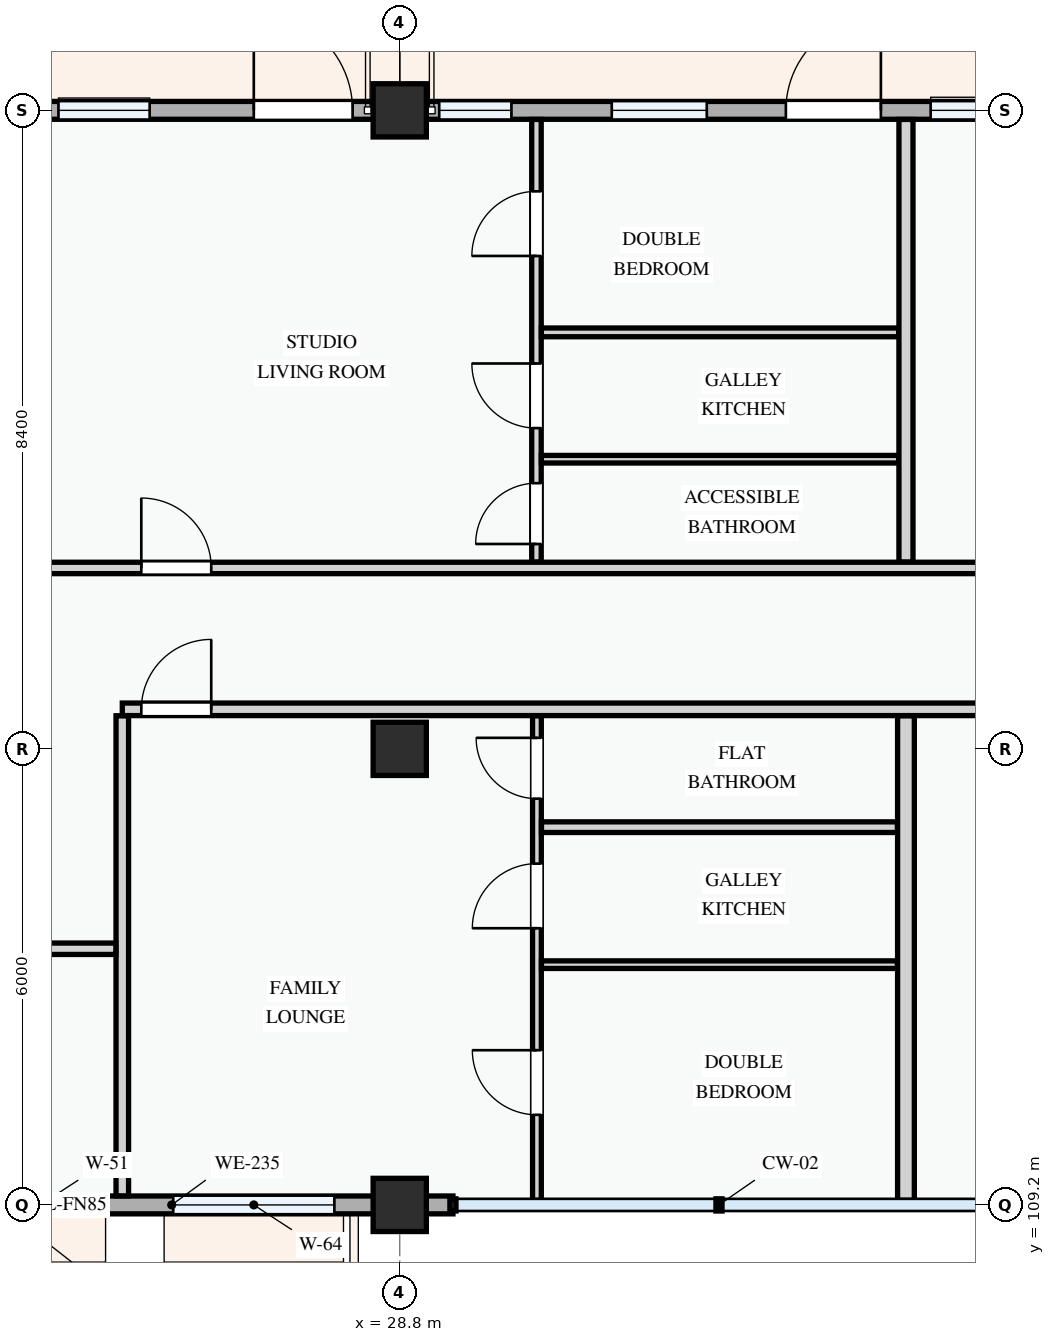
"""IFC4 building model, lengths in metres.
Left out: names, types, materials, properties, quantities, classifications, styles, units other than length and angle.
Written with IfcOpenShell. Run it as: python <this file> out.ifc"""

import sys

from ifc_helpers import new_model, si_unit, direction, frame, frame_2d, origin, origin_2d, place, context, subcontext, project, spatial, rectangle, extrude, element, fill, save


model = new_model("IFC4")
c1 = context("Model", 3, precision=1e-05, world=origin(), true_north=direction((0.0, 1.0)))
c2 = subcontext(c1, "Body", "Model", "MODEL_VIEW")
j1 = project(units=[si_unit("LENGTHUNIT", "METRE"), si_unit("PLANEANGLEUNIT", "RADIAN")], contexts=[c1])
p1 = place(None, origin())
s1 = spatial("IfcSite", under=j1, at=p1, CompositionType="ELEMENT")
p2 = place(p1, origin())
s2 = spatial("IfcBuilding", under=s1, at=p2, CompositionType="ELEMENT")
p3 = place(p2, frame((0.0, 0.0, 11.4)))
s3 = spatial("IfcBuildingStorey", under=s2, at=p3, CompositionType="ELEMENT", Elevation=11.4)
for number, where, z_axis, x_axis in (
    (1, (28.8, 109.2, 0.0), (0.0, 0.0, 1.0), (1.0, 0.0, 0.0)),
    (2, (28.8, 115.2, 0.0), (0.0, 0.0, 1.0), (1.0, 0.0, 0.0)),
    (3, (28.8, 123.6, 0.0), (0.0, 0.0, 1.0), (1.0, 0.0, 0.0)),
):
    element("IfcColumn", number, at=place(p3, frame(where, z_axis=z_axis, x_axis=x_axis)), inside=s3, PredefinedType="COLUMN", context=c2, shape_type="SweptSolid", body=[
        extrude(rectangle(XDim=0.7, YDim=0.7, at=origin_2d()), origin(), (0.0, 0.0, 1.0), 3.3),
    ])
p4 = place(p3, frame((22.8, 109.2, 0.0), z_axis=(0.0, 0.0, 1.0), x_axis=(1.0, 0.0, 0.0)))
e4 = element("IfcWall", 4, at=p4, inside=s3, PredefinedType="STANDARD", context=c2, shape_type="SweptSolid", body=[
    extrude(rectangle(XDim=6.0, YDim=0.235, at=frame_2d((3.0, 0.0))), origin(), (0.0, 0.0, 1.0), 2.475),
])
p5 = place(p4, frame((0.53, 0.0, 0.78)))
e5 = element("IfcOpeningElement", 5, at=p5, cuts=e4, PredefinedType="OPENING", context=c2, shape_type="SweptSolid", body=[
    extrude(rectangle(XDim=1.48, YDim=1.52, at=frame_2d((0.74, 0.76))), frame((0.0, 0.127, 0.0), z_axis=(0.0, -1.0, 0.0), x_axis=(1.0, 0.0, 0.0)), (0.0, 0.0, 1.0), 0.255),
])
p6 = place(p4, frame((3.02, 0.0, 0.78)))
e6 = element("IfcOpeningElement", 6, at=p6, cuts=e4, PredefinedType="OPENING", context=c2, shape_type="SweptSolid", body=[
    extrude(rectangle(XDim=2.12, YDim=1.44, at=frame_2d((1.06, 0.72))), frame((0.0, 0.127, 0.0), z_axis=(0.0, -1.0, 0.0), x_axis=(1.0, 0.0, 0.0)), (0.0, 0.0, 1.0), 0.255),
])
p7 = place(p3, frame((28.8, 109.2, 0.0), z_axis=(0.0, 0.0, 1.0), x_axis=(1.0, 0.0, 0.0)))
e7 = element("IfcWall", 7, at=p7, inside=s3, PredefinedType="STANDARD", context=c2, shape_type="SweptSolid", body=[
    extrude(rectangle(XDim=0.7, YDim=0.235, at=frame_2d((0.35, 0.0))), origin(), (0.0, 0.0, 1.0), 2.375),
])
p8 = place(p3, frame((37.2, 123.6, 0.0), z_axis=(0.0, 0.0, 1.0), x_axis=(-1.0, 0.0, 0.0)))
e8 = element("IfcWall", 8, at=p8, inside=s3, PredefinedType="STANDARD", context=c2, shape_type="SweptSolid", body=[
    extrude(rectangle(XDim=8.4, YDim=0.235, at=frame_2d((4.2, 0.0))), origin(), (0.0, 0.0, 1.0), 2.375),
])
p9 = place(p8, frame((2.07, 0.0, 0.0)))
e9 = element("IfcOpeningElement", 9, at=p9, cuts=e8, PredefinedType="OPENING", context=c2, shape_type="SweptSolid", body=[
    extrude(rectangle(XDim=1.25, YDim=2.2, at=frame_2d((0.625, 1.1))), frame((0.0, 0.127, 0.0), z_axis=(0.0, -1.0, 0.0), x_axis=(1.0, 0.0, 0.0)), (0.0, 0.0, 1.0), 0.255),
])
p10 = place(p8, frame((0.515, 0.0, 0.78)))
e10 = element("IfcOpeningElement", 10, at=p10, cuts=e8, PredefinedType="OPENING", context=c2, shape_type="SweptSolid", body=[
    extrude(rectangle(XDim=0.9, YDim=1.2, at=frame_2d((0.45, 0.6))), frame((0.0, 0.127, 0.0), z_axis=(0.0, -1.0, 0.0), x_axis=(1.0, 0.0, 0.0)), (0.0, 0.0, 1.0), 0.255),
])
p11 = place(p8, frame((4.361, 0.0, 0.78)))
e11 = element("IfcOpeningElement", 11, at=p11, cuts=e8, PredefinedType="OPENING", context=c2, shape_type="SweptSolid", body=[
    extrude(rectangle(XDim=1.25, YDim=1.45, at=frame_2d((0.625, 0.725))), frame((0.0, 0.127, 0.0), z_axis=(0.0, -1.0, 0.0), x_axis=(1.0, 0.0, 0.0)), (0.0, 0.0, 1.0), 0.255),
])
p12 = place(p8, frame((6.931, 0.0, 0.78)))
e12 = element("IfcOpeningElement", 12, at=p12, cuts=e8, PredefinedType="OPENING", context=c2, shape_type="SweptSolid", body=[
    extrude(rectangle(XDim=0.95, YDim=1.15, at=frame_2d((0.475, 0.575))), frame((0.0, 0.127, 0.0), z_axis=(0.0, -1.0, 0.0), x_axis=(1.0, 0.0, 0.0)), (0.0, 0.0, 1.0), 0.255),
])
p13 = place(p3, frame((28.8, 123.6, 0.0), z_axis=(0.0, 0.0, 1.0), x_axis=(-1.0, 0.0, 0.0)))
e13 = element("IfcWall", 13, at=p13, inside=s3, PredefinedType="STANDARD", context=c2, shape_type="SweptSolid", body=[
    extrude(rectangle(XDim=6.0, YDim=0.235, at=frame_2d((3.0, 0.0))), origin(), (0.0, 0.0, 1.0), 2.475),
])
p14 = place(p13, frame((0.62, 0.0, 0.0)))
e14 = element("IfcOpeningElement", 14, at=p14, cuts=e13, PredefinedType="OPENING", context=c2, shape_type="SweptSolid", body=[
    extrude(rectangle(XDim=1.3, YDim=2.15, at=frame_2d((0.65, 1.075))), frame((0.0, 0.127, 0.0), z_axis=(0.0, -1.0, 0.0), x_axis=(1.0, 0.0, 0.0)), (0.0, 0.0, 1.0), 0.255),
])
p15 = place(p13, frame((3.29, 0.0, 0.78)))
e15 = element("IfcOpeningElement", 15, at=p15, cuts=e13, PredefinedType="OPENING", context=c2, shape_type="SweptSolid", body=[
    extrude(rectangle(XDim=1.2, YDim=1.35, at=frame_2d((0.6, 0.675))), frame((0.0, 0.127, 0.0), z_axis=(0.0, -1.0, 0.0), x_axis=(1.0, 0.0, 0.0)), (0.0, 0.0, 1.0), 0.255),
])
p16 = place(p3, frame((25.15, 109.32, 0.0), z_axis=(0.0, 0.0, 1.0), x_axis=(0.0, 1.0, 0.0)))
e16 = element("IfcWall", 16, at=p16, inside=s3, PredefinedType="PARTITIONING", context=c2, shape_type="SweptSolid", body=[
    extrude(rectangle(XDim=6.316, YDim=0.165, at=frame_2d((3.158, 0.0))), origin(), (0.0, 0.0, 1.0), 3.0),
])
p17 = place(p3, frame((22.66, 112.57, 0.0), z_axis=(0.0, 0.0, 1.0), x_axis=(1.0, 0.0, 0.0)))
e17 = element("IfcWall", 17, at=p17, inside=s3, PredefinedType="PARTITIONING", context=c2, shape_type="SweptSolid", body=[
    extrude(rectangle(XDim=2.406, YDim=0.15, at=frame_2d((1.203, 0.0))), origin(), (0.0, 0.0, 1.0), 3.0),
])
p18 = place(p3, frame((30.605, 109.26, 0.0), z_axis=(0.0, 0.0, 1.0), x_axis=(0.0, 1.0, 0.0)))
e18 = element("IfcWall", 18, at=p18, inside=s3, PredefinedType="PARTITIONING", context=c2, shape_type="SweptSolid", body=[
    extrude(rectangle(XDim=6.375, YDim=0.115, at=frame_2d((3.188, 0.0))), origin(), (0.0, 0.0, 1.0), 3.0),
])
p19 = place(p18, frame((1.125, 0.0, 0.0)))
e19 = element("IfcOpeningElement", 19, at=p19, cuts=e18, PredefinedType="OPENING", context=c2, shape_type="SweptSolid", body=[
    extrude(rectangle(XDim=0.85, YDim=2.1, at=frame_2d((0.425, 1.05))), frame((0.0, 0.067, 0.0), z_axis=(0.0, -1.0, 0.0), x_axis=(1.0, 0.0, 0.0)), (0.0, 0.0, 1.0), 0.135),
])
p20 = place(p18, frame((3.58, 0.0, 0.0)))
e20 = element("IfcOpeningElement", 20, at=p20, cuts=e18, PredefinedType="OPENING", context=c2, shape_type="SweptSolid", body=[
    extrude(rectangle(XDim=0.85, YDim=2.1, at=frame_2d((0.425, 1.05))), frame((0.0, 0.067, 0.0), z_axis=(0.0, -1.0, 0.0), x_axis=(1.0, 0.0, 0.0)), (0.0, 0.0, 1.0), 0.135),
])
p21 = place(p18, frame((5.285, 0.0, 0.0)))
e21 = element("IfcOpeningElement", 21, at=p21, cuts=e18, PredefinedType="OPENING", context=c2, shape_type="SweptSolid", body=[
    extrude(rectangle(XDim=0.8, YDim=2.1, at=frame_2d((0.4, 1.05))), frame((0.0, 0.067, 0.0), z_axis=(0.0, -1.0, 0.0), x_axis=(1.0, 0.0, 0.0)), (0.0, 0.0, 1.0), 0.135),
])
p22 = place(p3, frame((30.665, 112.361, 0.0), z_axis=(0.0, 0.0, 1.0), x_axis=(1.0, 0.0, 0.0)))
e22 = element("IfcWall", 22, at=p22, inside=s3, PredefinedType="PARTITIONING", context=c2, shape_type="SweptSolid", body=[
    extrude(rectangle(XDim=4.683, YDim=0.1, at=frame_2d((2.342, 0.0))), origin(), (0.0, 0.0, 1.0), 3.0),
])
p23 = place(p3, frame((30.665, 114.17, 0.0), z_axis=(0.0, 0.0, 1.0), x_axis=(1.0, 0.0, 0.0)))
e23 = element("IfcWall", 23, at=p23, inside=s3, PredefinedType="PARTITIONING", context=c2, shape_type="SweptSolid", body=[
    extrude(rectangle(XDim=4.683, YDim=0.14, at=frame_2d((2.342, 0.0))), origin(), (0.0, 0.0, 1.0), 3.0),
])
p24 = place(p3, frame((30.599, 117.657, 0.0), z_axis=(0.0, 0.0, 1.0), x_axis=(0.0, 1.0, 0.0)))
e24 = element("IfcWall", 24, at=p24, inside=s3, PredefinedType="PARTITIONING", context=c2, shape_type="SweptSolid", body=[
    extrude(rectangle(XDim=5.823, YDim=0.125, at=frame_2d((2.912, 0.0))), origin(), (0.0, 0.0, 1.0), 3.0),
])
p25 = place(p24, frame((0.238, 0.0, 0.0)))
e25 = element("IfcOpeningElement", 25, at=p25, cuts=e24, PredefinedType="OPENING", context=c2, shape_type="SweptSolid", body=[
    extrude(rectangle(XDim=0.8, YDim=2.1, at=frame_2d((0.4, 1.05))), frame((0.0, 0.073, 0.0), z_axis=(0.0, -1.0, 0.0), x_axis=(1.0, 0.0, 0.0)), (0.0, 0.0, 1.0), 0.145),
])
p26 = place(p24, frame((1.763, 0.0, 0.0)))
e26 = element("IfcOpeningElement", 26, at=p26, cuts=e24, PredefinedType="OPENING", context=c2, shape_type="SweptSolid", body=[
    extrude(rectangle(XDim=0.85, YDim=2.1, at=frame_2d((0.425, 1.05))), frame((0.0, 0.073, 0.0), z_axis=(0.0, -1.0, 0.0), x_axis=(1.0, 0.0, 0.0)), (0.0, 0.0, 1.0), 0.145),
])
p27 = place(p24, frame((4.028, 0.0, 0.0)))
e27 = element("IfcOpeningElement", 27, at=p27, cuts=e24, PredefinedType="OPENING", context=c2, shape_type="SweptSolid", body=[
    extrude(rectangle(XDim=0.85, YDim=2.1, at=frame_2d((0.425, 1.05))), frame((0.0, 0.073, 0.0), z_axis=(0.0, -1.0, 0.0), x_axis=(1.0, 0.0, 0.0)), (0.0, 0.0, 1.0), 0.145),
])
p28 = place(p3, frame((30.663, 120.679, 0.0), z_axis=(0.0, 0.0, 1.0), x_axis=(1.0, 0.0, 0.0)))
e28 = element("IfcWall", 28, at=p28, inside=s3, PredefinedType="PARTITIONING", context=c2, shape_type="SweptSolid", body=[
    extrude(rectangle(XDim=4.702, YDim=0.115, at=frame_2d((2.351, 0.0))), origin(), (0.0, 0.0, 1.0), 3.0),
])
p29 = place(p3, frame((30.663, 119.01, 0.0), z_axis=(0.0, 0.0, 1.0), x_axis=(1.0, 0.0, 0.0)))
e29 = element("IfcWall", 29, at=p29, inside=s3, PredefinedType="PARTITIONING", context=c2, shape_type="SweptSolid", body=[
    extrude(rectangle(XDim=4.702, YDim=0.1, at=frame_2d((2.351, 0.0))), origin(), (0.0, 0.0, 1.0), 3.0),
])
p30 = place(p3, frame((35.46, 109.26, 0.0), z_axis=(0.0, 0.0, 1.0), x_axis=(0.0, 1.0, 0.0)))
e30 = element("IfcWall", 30, at=p30, inside=s3, PredefinedType="PARTITIONING", context=c2, shape_type="SweptSolid", body=[
    extrude(rectangle(XDim=6.375, YDim=0.22, at=frame_2d((3.188, 0.0))), origin(), (0.0, 0.0, 1.0), 3.0),
])
p31 = place(p3, frame((35.46, 117.657, 0.0), z_axis=(0.0, 0.0, 1.0), x_axis=(0.0, 1.0, 0.0)))
e31 = element("IfcWall", 31, at=p31, inside=s3, PredefinedType="PARTITIONING", context=c2, shape_type="SweptSolid", body=[
    extrude(rectangle(XDim=5.823, YDim=0.185, at=frame_2d((2.912, 0.0))), origin(), (0.0, 0.0, 1.0), 3.0),
])
p32 = place(p3, frame((25.15, 115.72, 0.0), z_axis=(0.0, 0.0, 1.0), x_axis=(1.0, 0.0, 0.0)))
e32 = element("IfcWall", 32, at=p32, inside=s3, PredefinedType="PARTITIONING", context=c2, shape_type="SweptSolid", body=[
    extrude(rectangle(XDim=32.331, YDim=0.165, at=frame_2d((16.165, 0.0))), origin(), (0.0, 0.0, 1.0), 3.0),
])
p33 = place(p32, frame((0.25, 0.0, 0.0)))
e33 = element("IfcOpeningElement", 33, at=p33, cuts=e32, PredefinedType="OPENING", context=c2, shape_type="SweptSolid", body=[
    extrude(rectangle(XDim=0.92, YDim=2.1, at=frame_2d((0.46, 1.05))), frame((0.0, 0.093, 0.0), z_axis=(0.0, -1.0, 0.0), x_axis=(1.0, 0.0, 0.0)), (0.0, 0.0, 1.0), 0.185),
])
p34 = place(p32, frame((14.548, 0.0, 0.0)))
e34 = element("IfcOpeningElement", 34, at=p34, cuts=e32, PredefinedType="OPENING", context=c2, shape_type="SweptSolid", body=[
    extrude(rectangle(XDim=0.96, YDim=2.12, at=frame_2d((0.48, 1.06))), frame((0.0, 0.093, 0.0), z_axis=(0.0, -1.0, 0.0), x_axis=(1.0, 0.0, 0.0)), (0.0, 0.0, 1.0), 0.185),
])
p35 = place(p32, frame((22.28, 0.0, 0.0)))
e35 = element("IfcOpeningElement", 35, at=p35, cuts=e32, PredefinedType="OPENING", context=c2, shape_type="SweptSolid", body=[
    extrude(rectangle(XDim=0.92, YDim=2.1, at=frame_2d((0.46, 1.05))), frame((0.0, 0.093, 0.0), z_axis=(0.0, -1.0, 0.0), x_axis=(1.0, 0.0, 0.0)), (0.0, 0.0, 1.0), 0.185),
])
p36 = place(p3, frame((22.66, 117.58, 0.0), z_axis=(0.0, 0.0, 1.0), x_axis=(1.0, 0.0, 0.0)))
e36 = element("IfcWall", 36, at=p36, inside=s3, PredefinedType="PARTITIONING", context=c2, shape_type="SweptSolid", body=[
    extrude(rectangle(XDim=34.88, YDim=0.15, at=frame_2d((17.44, 0.0))), origin(), (0.0, 0.0, 1.0), 3.0),
])
p37 = place(p36, frame((2.74, 0.0, 0.0)))
e37 = element("IfcOpeningElement", 37, at=p37, cuts=e36, PredefinedType="OPENING", context=c2, shape_type="SweptSolid", body=[
    extrude(rectangle(XDim=0.92, YDim=2.1, at=frame_2d((0.46, 1.05))), frame((0.0, 0.085, 0.0), z_axis=(0.0, -1.0, 0.0), x_axis=(1.0, 0.0, 0.0)), (0.0, 0.0, 1.0), 0.17),
])
p38 = place(p36, frame((17.085, 0.0, 0.0)))
e38 = element("IfcOpeningElement", 38, at=p38, cuts=e36, PredefinedType="OPENING", context=c2, shape_type="SweptSolid", body=[
    extrude(rectangle(XDim=0.92, YDim=2.1, at=frame_2d((0.46, 1.05))), frame((0.0, 0.085, 0.0), z_axis=(0.0, -1.0, 0.0), x_axis=(1.0, 0.0, 0.0)), (0.0, 0.0, 1.0), 0.17),
])
p39 = place(p36, frame((24.77, 0.0, 0.0)))
e39 = element("IfcOpeningElement", 39, at=p39, cuts=e36, PredefinedType="OPENING", context=c2, shape_type="SweptSolid", body=[
    extrude(rectangle(XDim=0.92, YDim=2.1, at=frame_2d((0.46, 1.05))), frame((0.0, 0.085, 0.0), z_axis=(0.0, -1.0, 0.0), x_axis=(1.0, 0.0, 0.0)), (0.0, 0.0, 1.0), 0.17),
])
p40 = place(p5, origin())
e40 = element("IfcWindow", 40, at=p40, inside=s3, PartitioningType="SINGLE_PANEL", PredefinedType="WINDOW", context=c2, shape_type="SweptSolid", body=[
    extrude(rectangle(XDim=1.48, YDim=1.52, at=frame_2d((0.74, 0.76))), frame((0.0, 0.03, 0.0), z_axis=(0.0, -1.0, 0.0), x_axis=(1.0, 0.0, 0.0)), (0.0, 0.0, 1.0), 0.06),
])
fill(e5, e40)
p41 = place(p6, origin())
e41 = element("IfcWindow", 41, at=p41, inside=s3, PartitioningType="DOUBLE_PANEL_VERTICAL", PredefinedType="WINDOW", context=c2, shape_type="SweptSolid", body=[
    extrude(rectangle(XDim=2.12, YDim=1.44, at=frame_2d((1.06, 0.72))), frame((0.0, 0.03, 0.0), z_axis=(0.0, -1.0, 0.0), x_axis=(1.0, 0.0, 0.0)), (0.0, 0.0, 1.0), 0.06),
])
fill(e6, e41)
p42 = place(p9, frame((1.25, 0.0, 0.0), z_axis=(0.0, 0.0, 1.0), x_axis=(-1.0, 0.0, 0.0)))
e42 = element("IfcDoor", 42, at=p42, inside=s3, OperationType="SINGLE_SWING_RIGHT", PredefinedType="DOOR", context=c2, shape_type="SweptSolid", body=[
    extrude(rectangle(XDim=1.25, YDim=2.2, at=frame_2d((0.625, 1.1))), frame((0.0, 0.025, 0.0), z_axis=(0.0, -1.0, 0.0), x_axis=(1.0, 0.0, 0.0)), (0.0, 0.0, 1.0), 0.05),
])
fill(e9, e42)
p43 = place(p10, origin())
e43 = element("IfcWindow", 43, at=p43, inside=s3, PartitioningType="SINGLE_PANEL", PredefinedType="WINDOW", context=c2, shape_type="SweptSolid", body=[
    extrude(rectangle(XDim=0.9, YDim=1.2, at=frame_2d((0.45, 0.6))), frame((0.0, 0.03, 0.0), z_axis=(0.0, -1.0, 0.0), x_axis=(1.0, 0.0, 0.0)), (0.0, 0.0, 1.0), 0.06),
])
fill(e10, e43)
p44 = place(p11, origin())
e44 = element("IfcWindow", 44, at=p44, inside=s3, PartitioningType="SINGLE_PANEL", PredefinedType="WINDOW", context=c2, shape_type="SweptSolid", body=[
    extrude(rectangle(XDim=1.25, YDim=1.45, at=frame_2d((0.625, 0.725))), frame((0.0, 0.03, 0.0), z_axis=(0.0, -1.0, 0.0), x_axis=(1.0, 0.0, 0.0)), (0.0, 0.0, 1.0), 0.06),
])
fill(e11, e44)
p45 = place(p12, origin())
e45 = element("IfcWindow", 45, at=p45, inside=s3, PartitioningType="SINGLE_PANEL", PredefinedType="WINDOW", context=c2, shape_type="SweptSolid", body=[
    extrude(rectangle(XDim=0.95, YDim=1.15, at=frame_2d((0.475, 0.575))), frame((0.0, 0.03, 0.0), z_axis=(0.0, -1.0, 0.0), x_axis=(1.0, 0.0, 0.0)), (0.0, 0.0, 1.0), 0.06),
])
fill(e12, e45)
p46 = place(p14, frame((1.3, 0.0, 0.0), z_axis=(0.0, 0.0, 1.0), x_axis=(-1.0, 0.0, 0.0)))
e46 = element("IfcDoor", 46, at=p46, inside=s3, OperationType="SINGLE_SWING_LEFT", PredefinedType="DOOR", context=c2, shape_type="SweptSolid", body=[
    extrude(rectangle(XDim=1.3, YDim=2.15, at=frame_2d((0.65, 1.075))), frame((0.0, 0.025, 0.0), z_axis=(0.0, -1.0, 0.0), x_axis=(1.0, 0.0, 0.0)), (0.0, 0.0, 1.0), 0.05),
])
fill(e14, e46)
p47 = place(p15, origin())
e47 = element("IfcWindow", 47, at=p47, inside=s3, PartitioningType="SINGLE_PANEL", PredefinedType="WINDOW", context=c2, shape_type="SweptSolid", body=[
    extrude(rectangle(XDim=1.2, YDim=1.35, at=frame_2d((0.6, 0.675))), frame((0.0, 0.03, 0.0), z_axis=(0.0, -1.0, 0.0), x_axis=(1.0, 0.0, 0.0)), (0.0, 0.0, 1.0), 0.06),
])
fill(e15, e47)
p48 = place(p19, origin())
e48 = element("IfcDoor", 48, at=p48, inside=s3, OperationType="SINGLE_SWING_RIGHT", PredefinedType="DOOR", context=c2, shape_type="SweptSolid", body=[
    extrude(rectangle(XDim=0.85, YDim=2.1, at=frame_2d((0.425, 1.05))), frame((0.0, 0.025, 0.0), z_axis=(0.0, -1.0, 0.0), x_axis=(1.0, 0.0, 0.0)), (0.0, 0.0, 1.0), 0.05),
])
fill(e19, e48)
p49 = place(p20, origin())
e49 = element("IfcDoor", 49, at=p49, inside=s3, OperationType="SINGLE_SWING_LEFT", PredefinedType="DOOR", context=c2, shape_type="SweptSolid", body=[
    extrude(rectangle(XDim=0.85, YDim=2.1, at=frame_2d((0.425, 1.05))), frame((0.0, 0.025, 0.0), z_axis=(0.0, -1.0, 0.0), x_axis=(1.0, 0.0, 0.0)), (0.0, 0.0, 1.0), 0.05),
])
fill(e20, e49)
p50 = place(p21, origin())
e50 = element("IfcDoor", 50, at=p50, inside=s3, OperationType="SINGLE_SWING_RIGHT", PredefinedType="DOOR", context=c2, shape_type="SweptSolid", body=[
    extrude(rectangle(XDim=0.8, YDim=2.1, at=frame_2d((0.4, 1.05))), frame((0.0, 0.025, 0.0), z_axis=(0.0, -1.0, 0.0), x_axis=(1.0, 0.0, 0.0)), (0.0, 0.0, 1.0), 0.05),
])
fill(e21, e50)
p51 = place(p25, origin())
e51 = element("IfcDoor", 51, at=p51, inside=s3, OperationType="SINGLE_SWING_LEFT", PredefinedType="DOOR", context=c2, shape_type="SweptSolid", body=[
    extrude(rectangle(XDim=0.8, YDim=2.1, at=frame_2d((0.4, 1.05))), frame((0.0, 0.025, 0.0), z_axis=(0.0, -1.0, 0.0), x_axis=(1.0, 0.0, 0.0)), (0.0, 0.0, 1.0), 0.05),
])
fill(e25, e51)
p52 = place(p26, origin())
e52 = element("IfcDoor", 52, at=p52, inside=s3, OperationType="SINGLE_SWING_RIGHT", PredefinedType="DOOR", context=c2, shape_type="SweptSolid", body=[
    extrude(rectangle(XDim=0.85, YDim=2.1, at=frame_2d((0.425, 1.05))), frame((0.0, 0.025, 0.0), z_axis=(0.0, -1.0, 0.0), x_axis=(1.0, 0.0, 0.0)), (0.0, 0.0, 1.0), 0.05),
])
fill(e26, e52)
p53 = place(p27, origin())
e53 = element("IfcDoor", 53, at=p53, inside=s3, OperationType="SINGLE_SWING_LEFT", PredefinedType="DOOR", context=c2, shape_type="SweptSolid", body=[
    extrude(rectangle(XDim=0.85, YDim=2.1, at=frame_2d((0.425, 1.05))), frame((0.0, 0.025, 0.0), z_axis=(0.0, -1.0, 0.0), x_axis=(1.0, 0.0, 0.0)), (0.0, 0.0, 1.0), 0.05),
])
fill(e27, e53)
p54 = place(p33, origin())
e54 = element("IfcDoor", 54, at=p54, inside=s3, OperationType="SINGLE_SWING_RIGHT", PredefinedType="DOOR", context=c2, shape_type="SweptSolid", body=[
    extrude(rectangle(XDim=0.92, YDim=2.1, at=frame_2d((0.46, 1.05))), frame((0.0, 0.025, 0.0), z_axis=(0.0, -1.0, 0.0), x_axis=(1.0, 0.0, 0.0)), (0.0, 0.0, 1.0), 0.05),
])
fill(e33, e54)
p55 = place(p37, origin())
e55 = element("IfcDoor", 55, at=p55, inside=s3, OperationType="SINGLE_SWING_LEFT", PredefinedType="DOOR", context=c2, shape_type="SweptSolid", body=[
    extrude(rectangle(XDim=0.92, YDim=2.1, at=frame_2d((0.46, 1.05))), frame((0.0, 0.025, 0.0), z_axis=(0.0, -1.0, 0.0), x_axis=(1.0, 0.0, 0.0)), (0.0, 0.0, 1.0), 0.05),
])
fill(e37, e55)
save(model, sys.argv[1])
